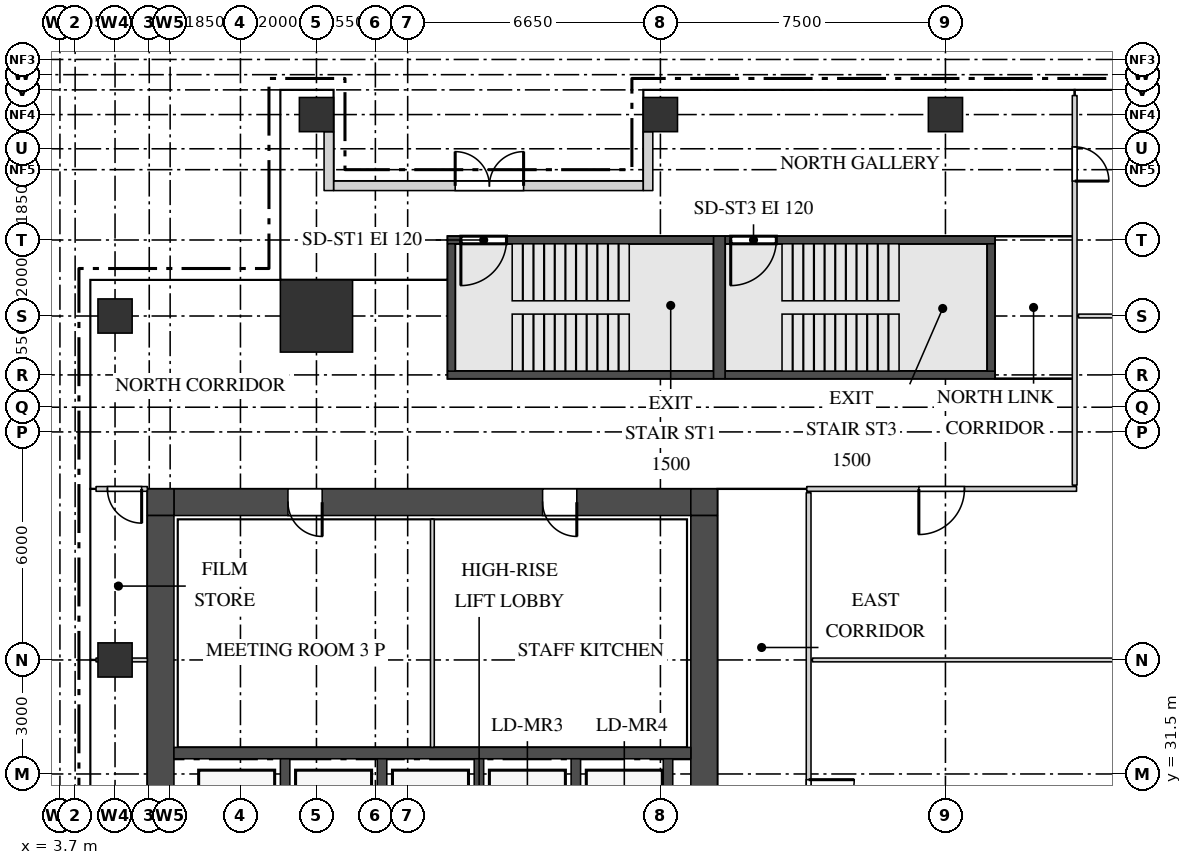
"""IFC4 building model, lengths in metres.
Left out: names, types, materials, properties, quantities, classifications, styles, units other than length and angle.
Written with IfcOpenShell. Run it as: python <this file> out.ifc"""

import sys

from ifc_helpers import new_model, si_unit, direction, frame, frame_2d, origin, origin_2d, place, context, subcontext, project, spatial, rectangle, extrude, source, transform, mapped, element, fill, save


model = new_model("IFC4")
c1 = context("Model", 3, precision=1e-05, world=origin(), true_north=direction((0.0, 1.0)))
c2 = subcontext(c1, "Body", "Model", "MODEL_VIEW")
j1 = project(units=[si_unit("LENGTHUNIT", "METRE"), si_unit("PLANEANGLEUNIT", "RADIAN")], contexts=[c1])
p1 = place(None, origin())
s1 = spatial("IfcSite", under=j1, at=p1, CompositionType="ELEMENT")
p2 = place(p1, origin())
s2 = spatial("IfcBuilding", under=s1, at=p2, CompositionType="ELEMENT")
p3 = place(p2, frame((0.0, 0.0, 246.2)))
s3 = spatial("IfcBuildingStorey", under=s2, at=p3, CompositionType="ELEMENT", Elevation=246.2)
m1 = source(origin(), c2, "Body", "SweptSolid", [
    extrude(rectangle(XDim=13.6, YDim=0.7, at=frame_2d((6.8, 0.0))), origin(), (0.0, 0.0, 1.0), 3.75),
])
p4 = place(p3, frame((6.7, 38.65, 0.0), z_axis=(0.0, 0.0, 1.0), x_axis=(1.0, 0.0, 0.0)))
e1 = element("IfcWall", 1, at=p4, inside=s3, PredefinedType="SHEAR", context=c2, shape_type="MappedRepresentation", body=[
    mapped(m1, transform((0.0, 0.0, 0.0))),
])
m2 = source(origin(), c2, "Body", "SweptSolid", [
    extrude(rectangle(XDim=0.9, YDim=2.1, at=frame_2d((0.45, 1.05))), frame((0.0, 0.36, 0.0), z_axis=(0.0, -1.0, 0.0), x_axis=(1.0, 0.0, 0.0)), (0.0, 0.0, 1.0), 0.72),
])
p5 = place(p4, frame((3.0, 0.0, 0.0)))
e2 = element("IfcOpeningElement", 2, at=p5, cuts=e1, PredefinedType="OPENING", context=c2, shape_type="MappedRepresentation", body=[
    mapped(m2, transform((0.0, 0.0, 0.0))),
])
p6 = place(p4, frame((9.7, 0.0, 0.0)))
e3 = element("IfcOpeningElement", 3, at=p6, cuts=e1, PredefinedType="OPENING", context=c2, shape_type="MappedRepresentation", body=[
    mapped(m2, transform((0.0, 0.0, 0.0))),
])
m3 = source(origin(), c2, "Body", "SweptSolid", [
    extrude(rectangle(XDim=0.7, YDim=0.7, at=frame_2d((0.35, 0.0))), origin(), (0.0, 0.0, 1.0), 3.75),
])
for number, where, z_axis, x_axis in (
    (4, (20.3, 38.65, 0.0), (0.0, 0.0, 1.0), (1.0, 0.0, 0.0)),
    (5, (6.0, 38.65, 0.0), (0.0, 0.0, 1.0), (1.0, 0.0, 0.0)),
):
    element("IfcWall", number, at=place(p3, frame(where, z_axis=z_axis, x_axis=x_axis)), inside=s3, PredefinedType="SHEAR", context=c2, shape_type="MappedRepresentation", body=[
        mapped(m3, transform((0.0, 0.0, 0.0))),
    ])
m4 = source(origin(), c2, "Body", "SweptSolid", [
    extrude(rectangle(XDim=22.6, YDim=0.7, at=frame_2d((11.3, 0.0))), origin(), (0.0, 0.0, 1.0), 3.75),
])
p7 = place(p3, frame((20.65, 15.7, 0.0), z_axis=(0.0, 0.0, 1.0), x_axis=(0.0, 1.0, 0.0)))
e6 = element("IfcWall", 6, at=p7, inside=s3, PredefinedType="SHEAR", context=c2, shape_type="MappedRepresentation", body=[
    mapped(m4, transform((0.0, 0.0, 0.0))),
])
m5 = source(origin(), c2, "Body", "SweptSolid", [
    extrude(rectangle(XDim=1.8, YDim=2.1, at=frame_2d((0.9, 1.05))), frame((0.0, 0.36, 0.0), z_axis=(0.0, -1.0, 0.0), x_axis=(1.0, 0.0, 0.0)), (0.0, 0.0, 1.0), 0.72),
])
p8 = place(p7, frame((10.8, 0.0, 0.0)))
e7 = element("IfcOpeningElement", 7, at=p8, cuts=e6, PredefinedType="OPENING", context=c2, shape_type="MappedRepresentation", body=[
    mapped(m5, transform((0.0, 0.0, 0.0))),
])
p9 = place(p7, frame((0.45, 0.0, 0.0)))
e8 = element("IfcOpeningElement", 8, at=p9, cuts=e6, PredefinedType="OPENING", context=c2, shape_type="MappedRepresentation", body=[
    mapped(m2, transform((0.0, 0.0, 0.0))),
])
p10 = place(p7, frame((2.9, 0.0, 0.0)))
e9 = element("IfcOpeningElement", 9, at=p10, cuts=e6, PredefinedType="OPENING", context=c2, shape_type="MappedRepresentation", body=[
    mapped(m2, transform((0.0, 0.0, 0.0))),
])
p11 = place(p7, frame((5.65, 0.0, 0.0)))
e10 = element("IfcOpeningElement", 10, at=p11, cuts=e6, PredefinedType="OPENING", context=c2, shape_type="MappedRepresentation", body=[
    mapped(m2, transform((0.0, 0.0, 0.0))),
])
p12 = place(p3, frame((6.35, 15.7, 0.0), z_axis=(0.0, 0.0, 1.0), x_axis=(0.0, 1.0, 0.0)))
e11 = element("IfcWall", 11, at=p12, inside=s3, PredefinedType="SHEAR", context=c2, shape_type="MappedRepresentation", body=[
    mapped(m4, transform((0.0, 0.0, 0.0))),
])
m6 = source(origin(), c2, "Body", "SweptSolid", [
    extrude(rectangle(XDim=7.0, YDim=0.2, at=frame_2d((3.5, 0.0))), origin(), (0.0, 0.0, 1.0), 3.75),
])
p13 = place(p3, frame((13.9, 45.55, 0.0), z_axis=(0.0, 0.0, 1.0), x_axis=(1.0, 0.0, 0.0)))
e12 = element("IfcWall", 12, at=p13, inside=s3, PredefinedType="SHEAR", context=c2, shape_type="MappedRepresentation", body=[
    mapped(m6, transform((0.0, 0.0, 0.0))),
])
m7 = source(origin(), c2, "Body", "SweptSolid", [
    extrude(rectangle(XDim=1.2, YDim=2.1, at=frame_2d((0.6, 1.05))), frame((0.0, 0.11, 0.0), z_axis=(0.0, -1.0, 0.0), x_axis=(1.0, 0.0, 0.0)), (0.0, 0.0, 1.0), 0.22),
])
p14 = place(p13, frame((0.35, 0.0, 0.0)))
e13 = element("IfcOpeningElement", 13, at=p14, cuts=e12, PredefinedType="OPENING", context=c2, shape_type="MappedRepresentation", body=[
    mapped(m7, transform((0.0, 0.0, 0.0))),
])
p15 = place(p3, frame((13.9, 42.0, 0.0), z_axis=(0.0, 0.0, 1.0), x_axis=(1.0, 0.0, 0.0)))
e14 = element("IfcWall", 14, at=p15, inside=s3, PredefinedType="SHEAR", context=c2, shape_type="MappedRepresentation", body=[
    mapped(m6, transform((0.0, 0.0, 0.0))),
])
m8 = source(origin(), c2, "Body", "SweptSolid", [
    extrude(rectangle(XDim=7.1, YDim=0.2, at=frame_2d((3.55, 0.0))), origin(), (0.0, 0.0, 1.0), 3.75),
])
p16 = place(p3, frame((21.2, 45.55, 0.0), z_axis=(0.0, 0.0, 1.0), x_axis=(1.0, 0.0, 0.0)))
e15 = element("IfcWall", 15, at=p16, inside=s3, PredefinedType="SHEAR", context=c2, shape_type="MappedRepresentation", body=[
    mapped(m8, transform((0.0, 0.0, 0.0))),
])
p17 = place(p16, frame((0.15, 0.0, 0.0)))
e16 = element("IfcOpeningElement", 16, at=p17, cuts=e15, PredefinedType="OPENING", context=c2, shape_type="MappedRepresentation", body=[
    mapped(m7, transform((0.0, 0.0, 0.0))),
])
p18 = place(p3, frame((21.2, 42.0, 0.0), z_axis=(0.0, 0.0, 1.0), x_axis=(1.0, 0.0, 0.0)))
e17 = element("IfcWall", 17, at=p18, inside=s3, PredefinedType="SHEAR", context=c2, shape_type="MappedRepresentation", body=[
    mapped(m8, transform((0.0, 0.0, 0.0))),
])
m9 = source(origin(), c2, "Body", "SweptSolid", [
    extrude(rectangle(XDim=3.75, YDim=0.3, at=frame_2d((1.875, 0.0))), origin(), (0.0, 0.0, 1.0), 3.75),
])
p19 = place(p3, frame((21.05, 41.9, 0.0), z_axis=(0.0, 0.0, 1.0), x_axis=(0.0, 1.0, 0.0)))
e18 = element("IfcWall", 18, at=p19, inside=s3, PredefinedType="SHEAR", context=c2, shape_type="MappedRepresentation", body=[
    mapped(m9, transform((0.0, 0.0, 0.0))),
])
m10 = source(origin(), c2, "Body", "SweptSolid", [
    extrude(rectangle(XDim=3.35, YDim=0.2, at=frame_2d((1.675, 0.0))), origin(), (0.0, 0.0, 1.0), 3.75),
])
for number, where, z_axis, x_axis in (
    (19, (14.0, 42.1, 0.0), (0.0, 0.0, 1.0), (0.0, 1.0, 0.0)),
    (20, (28.2, 42.1, 0.0), (0.0, 0.0, 1.0), (0.0, 1.0, 0.0)),
):
    element("IfcWall", number, at=place(p3, frame(where, z_axis=z_axis, x_axis=x_axis)), inside=s3, PredefinedType="SHEAR", context=c2, shape_type="MappedRepresentation", body=[
        mapped(m10, transform((0.0, 0.0, 0.0))),
    ])
m11 = source(origin(), c2, "Body", "SweptSolid", [
    extrude(rectangle(XDim=13.6, YDim=0.3, at=frame_2d((6.8, 0.0))), origin(), (0.0, 0.0, 1.0), 3.75),
])
p20 = place(p3, frame((6.7, 32.05, 0.0), z_axis=(0.0, 0.0, 1.0), x_axis=(1.0, 0.0, 0.0)))
e21 = element("IfcWall", 21, at=p20, inside=s3, PredefinedType="STANDARD", context=c2, shape_type="MappedRepresentation", body=[
    mapped(m11, transform((0.0, 0.0, 0.0))),
])
m12 = source(origin(), c2, "Body", "SweptSolid", [
    extrude(rectangle(XDim=2.4, YDim=0.25, at=frame_2d((1.2, 0.0))), origin(), (0.0, 0.0, 1.0), 3.75),
])
for number, where, z_axis, x_axis in (
    (22, (17.275, 29.5, 0.0), (0.0, 0.0, 1.0), (0.0, 1.0, 0.0)),
    (23, (19.7, 29.5, 0.0), (0.0, 0.0, 1.0), (0.0, 1.0, 0.0)),
    (24, (9.625, 29.5, 0.0), (0.0, 0.0, 1.0), (0.0, 1.0, 0.0)),
    (25, (12.175, 29.5, 0.0), (0.0, 0.0, 1.0), (0.0, 1.0, 0.0)),
    (26, (14.725, 29.5, 0.0), (0.0, 0.0, 1.0), (0.0, 1.0, 0.0)),
):
    element("IfcWall", number, at=place(p3, frame(where, z_axis=z_axis, x_axis=x_axis)), inside=s3, PredefinedType="STANDARD", context=c2, shape_type="MappedRepresentation", body=[
        mapped(m12, transform((0.0, 0.0, 0.0))),
    ])
m13 = source(origin(), c2, "Body", "SweptSolid", [
    extrude(rectangle(XDim=1.9, YDim=1.9, at=origin_2d()), origin(), (0.0, 0.0, 1.0), 4.0),
])
p21 = place(p3, frame((10.45, 43.55, 0.0), z_axis=(0.0, 0.0, 1.0), x_axis=(1.0, 0.0, 0.0)))
e27 = element("IfcColumn", 27, at=p21, inside=s3, PredefinedType="COLUMN", context=c2, shape_type="MappedRepresentation", body=[
    mapped(m13, transform((0.0, 0.0, 0.0))),
])
m14 = source(origin(), c2, "Body", "SweptSolid", [
    extrude(rectangle(XDim=0.9, YDim=0.9, at=origin_2d()), origin(), (0.0, 0.0, 1.0), 3.75),
])
for number, where, z_axis, x_axis in (
    (28, (10.45, 48.85, 0.0), (0.0, 0.0, 1.0), (1.0, 0.0, 0.0)),
    (29, (19.5, 48.85, 0.0), (0.0, 0.0, 1.0), (1.0, 0.0, 0.0)),
    (30, (27.0, 48.85, 0.0), (0.0, 0.0, 1.0), (1.0, 0.0, 0.0)),
    (31, (5.15, 34.5, 0.0), (0.0, 0.0, 1.0), (1.0, 0.0, 0.0)),
    (32, (5.15, 43.55, 0.0), (0.0, 0.0, 1.0), (1.0, 0.0, 0.0)),
):
    element("IfcColumn", number, at=place(p3, frame(where, z_axis=z_axis, x_axis=x_axis)), inside=s3, PredefinedType="COLUMN", context=c2, shape_type="MappedRepresentation", body=[
        mapped(m14, transform((0.0, 0.0, 0.0))),
    ])
m15 = source(origin(), c2, "Body", "SweptSolid", [
    extrude(rectangle(XDim=8.15, YDim=0.25, at=frame_2d((4.075, 0.0))), origin(), (0.0, 0.0, 1.0), 3.35),
])
p22 = place(p3, frame((10.9, 46.975, 0.0), z_axis=(0.0, 0.0, 1.0), x_axis=(1.0, 0.0, 0.0)))
e33 = element("IfcWall", 33, at=p22, inside=s3, PredefinedType="SOLIDWALL", context=c2, shape_type="MappedRepresentation", body=[
    mapped(m15, transform((0.0, 0.0, 0.0))),
])
m16 = source(origin(), c2, "Body", "SweptSolid", [
    extrude(rectangle(XDim=2.55, YDim=2.4, at=frame_2d((1.275, 1.2))), frame((0.0, 0.135, 0.0), z_axis=(0.0, -1.0, 0.0), x_axis=(1.0, 0.0, 0.0)), (0.0, 0.0, 1.0), 0.27),
])
p23 = place(p22, frame((0.35, 0.0, 0.0)))
e34 = element("IfcOpeningElement", 34, at=p23, cuts=e33, PredefinedType="OPENING", context=c2, shape_type="MappedRepresentation", body=[
    mapped(m16, transform((0.0, 0.0, 0.0))),
])
p24 = place(p22, frame((5.3, 0.0, 0.0)))
e35 = element("IfcOpeningElement", 35, at=p24, cuts=e33, PredefinedType="OPENING", context=c2, shape_type="MappedRepresentation", body=[
    mapped(m16, transform((0.0, 0.0, 0.0))),
])
m17 = source(origin(), c2, "Body", "SweptSolid", [
    extrude(rectangle(XDim=1.8, YDim=2.4, at=frame_2d((0.9, 1.2))), frame((0.0, 0.135, 0.0), z_axis=(0.0, -1.0, 0.0), x_axis=(1.0, 0.0, 0.0)), (0.0, 0.0, 1.0), 0.27),
])
p25 = place(p22, frame((3.2, 0.0, 0.0)))
e36 = element("IfcOpeningElement", 36, at=p25, cuts=e33, PredefinedType="OPENING", context=c2, shape_type="MappedRepresentation", body=[
    mapped(m17, transform((0.0, 0.0, 0.0))),
])
m18 = source(origin(), c2, "Body", "SweptSolid", [
    extrude(rectangle(XDim=1.55, YDim=0.25, at=frame_2d((0.775, 0.0))), origin(), (0.0, 0.0, 1.0), 3.35),
])
for number, where, z_axis, x_axis in (
    (37, (10.775, 48.4, 0.0), (0.0, 0.0, 1.0), (0.0, -1.0, 0.0)),
    (38, (19.175, 48.4, 0.0), (0.0, 0.0, 1.0), (0.0, -1.0, 0.0)),
):
    element("IfcWall", number, at=place(p3, frame(where, z_axis=z_axis, x_axis=x_axis)), inside=s3, PredefinedType="SOLIDWALL", context=c2, shape_type="MappedRepresentation", body=[
        mapped(m18, transform((0.0, 0.0, 0.0))),
    ])
m19 = source(origin(), c2, "Body", "SweptSolid", [
    extrude(rectangle(XDim=20.8, YDim=0.125, at=frame_2d((10.4, 0.0))), origin(), (0.0, 0.0, 1.0), 3.8),
])
p26 = place(p3, frame((23.4, 18.1, 0.0), z_axis=(0.0, 0.0, 1.0), x_axis=(0.0, 1.0, 0.0)))
e39 = element("IfcWall", 39, at=p26, inside=s3, PredefinedType="PARTITIONING", context=c2, shape_type="MappedRepresentation", body=[
    mapped(m19, transform((0.0, 0.0, 0.0))),
])
m20 = source(origin(), c2, "Body", "SweptSolid", [
    extrude(rectangle(XDim=1.2, YDim=2.1, at=frame_2d((0.6, 1.05))), frame((0.0, 0.073, 0.0), z_axis=(0.0, -1.0, 0.0), x_axis=(1.0, 0.0, 0.0)), (0.0, 0.0, 1.0), 0.145),
])
p27 = place(p26, frame((12.05, 0.0, 0.0)))
e40 = element("IfcOpeningElement", 40, at=p27, cuts=e39, PredefinedType="OPENING", context=c2, shape_type="MappedRepresentation", body=[
    mapped(m20, transform((0.0, 0.0, 0.0))),
])
m21 = source(origin(), c2, "Body", "SweptSolid", [
    extrude(rectangle(XDim=6.0, YDim=0.1, at=frame_2d((3.0, 0.0))), origin(), (0.0, 0.0, 1.0), 3.8),
])
p28 = place(p3, frame((13.5, 32.2, 0.0), z_axis=(0.0, 0.0, 1.0), x_axis=(0.0, 1.0, 0.0)))
e41 = element("IfcWall", 41, at=p28, inside=s3, PredefinedType="PARTITIONING", context=c2, shape_type="MappedRepresentation", body=[
    mapped(m21, transform((0.0, 0.0, 0.0))),
])
m22 = source(origin(), c2, "Body", "SweptSolid", [
    extrude(rectangle(XDim=1.35, YDim=0.1, at=frame_2d((0.675, 0.0))), origin(), (0.0, 0.0, 1.0), 3.8),
])
p29 = place(p3, frame((4.65, 34.5, 0.0), z_axis=(0.0, 0.0, 1.0), x_axis=(1.0, 0.0, 0.0)))
e42 = element("IfcWall", 42, at=p29, inside=s3, PredefinedType="PARTITIONING", context=c2, shape_type="MappedRepresentation", body=[
    mapped(m22, transform((0.0, 0.0, 0.0))),
])
m23 = source(origin(), c2, "Body", "SweptSolid", [
    extrude(rectangle(XDim=25.85, YDim=0.1, at=frame_2d((12.925, 0.0))), origin(), (0.0, 0.0, 1.0), 3.8),
])
p30 = place(p3, frame((23.5, 34.5, 0.0), z_axis=(0.0, 0.0, 1.0), x_axis=(1.0, 0.0, 0.0)))
e43 = element("IfcWall", 43, at=p30, inside=s3, PredefinedType="PARTITIONING", context=c2, shape_type="MappedRepresentation", body=[
    mapped(m23, transform((0.0, 0.0, 0.0))),
])
m24 = source(origin(), c2, "Body", "SweptSolid", [
    extrude(rectangle(XDim=1.35, YDim=0.125, at=frame_2d((0.675, 0.0))), origin(), (0.0, 0.0, 1.0), 3.8),
])
p31 = place(p3, frame((4.65, 39.0, 0.0), z_axis=(0.0, 0.0, 1.0), x_axis=(1.0, 0.0, 0.0)))
e44 = element("IfcWall", 44, at=p31, inside=s3, PredefinedType="PARTITIONING", context=c2, shape_type="MappedRepresentation", body=[
    mapped(m24, transform((0.0, 0.0, 0.0))),
])
m25 = source(origin(), c2, "Body", "SweptSolid", [
    extrude(rectangle(XDim=0.9, YDim=2.1, at=frame_2d((0.45, 1.05))), frame((0.0, 0.073, 0.0), z_axis=(0.0, -1.0, 0.0), x_axis=(1.0, 0.0, 0.0)), (0.0, 0.0, 1.0), 0.145),
])
p32 = place(p31, frame((0.3, 0.0, 0.0)))
e45 = element("IfcOpeningElement", 45, at=p32, cuts=e44, PredefinedType="OPENING", context=c2, shape_type="MappedRepresentation", body=[
    mapped(m25, transform((0.0, 0.0, 0.0))),
])
m26 = source(origin(), c2, "Body", "SweptSolid", [
    extrude(rectangle(XDim=7.1, YDim=0.125, at=frame_2d((3.55, 0.0))), origin(), (0.0, 0.0, 1.0), 3.8),
])
p33 = place(p3, frame((23.35, 39.0, 0.0), z_axis=(0.0, 0.0, 1.0), x_axis=(1.0, 0.0, 0.0)))
e46 = element("IfcWall", 46, at=p33, inside=s3, PredefinedType="PARTITIONING", context=c2, shape_type="MappedRepresentation", body=[
    mapped(m26, transform((0.0, 0.0, 0.0))),
])
p34 = place(p33, frame((2.95, 0.0, 0.0)))
e47 = element("IfcOpeningElement", 47, at=p34, cuts=e46, PredefinedType="OPENING", context=c2, shape_type="MappedRepresentation", body=[
    mapped(m20, transform((0.0, 0.0, 0.0))),
])
m27 = source(origin(), c2, "Body", "SweptSolid", [
    extrude(rectangle(XDim=10.25, YDim=0.125, at=frame_2d((5.125, 0.0))), origin(), (0.0, 0.0, 1.0), 3.8),
])
p35 = place(p3, frame((30.4, 39.1, 0.0), z_axis=(0.0, 0.0, 1.0), x_axis=(0.0, 1.0, 0.0)))
e48 = element("IfcWall", 48, at=p35, inside=s3, PredefinedType="PARTITIONING", context=c2, shape_type="MappedRepresentation", body=[
    mapped(m27, transform((0.0, 0.0, 0.0))),
])
p36 = place(p35, frame((8.0, 0.0, 0.0)))
e49 = element("IfcOpeningElement", 49, at=p36, cuts=e48, PredefinedType="OPENING", context=c2, shape_type="MappedRepresentation", body=[
    mapped(m25, transform((0.0, 0.0, 0.0))),
])
m28 = source(origin(), c2, "Body", "SweptSolid", [
    extrude(rectangle(XDim=18.85, YDim=0.1, at=frame_2d((9.425, 0.0))), origin(), (0.0, 0.0, 1.0), 3.3),
])
p37 = place(p3, frame((30.5, 43.55, 0.0), z_axis=(0.0, 0.0, 1.0), x_axis=(1.0, 0.0, 0.0)))
e50 = element("IfcWall", 50, at=p37, inside=s3, PredefinedType="PARTITIONING", context=c2, shape_type="MappedRepresentation", body=[
    mapped(m28, transform((0.0, 0.0, 0.0))),
])
m29 = source(origin(), c2, "Body", "SweptSolid", [
    extrude(rectangle(XDim=2.55, YDim=2.4, at=frame_2d((1.275, 1.2))), frame((0.0, 0.03, 0.0), z_axis=(0.0, -1.0, 0.0), x_axis=(1.0, 0.0, 0.0)), (0.0, 0.0, 1.0), 0.06),
])
p38 = place(p23, origin())
e51 = element("IfcWindow", 51, at=p38, inside=s3, PartitioningType="SINGLE_PANEL", PredefinedType="WINDOW", context=c2, shape_type="MappedRepresentation", body=[
    mapped(m29, transform((0.0, 0.0, 0.0))),
])
fill(e34, e51)
p39 = place(p24, origin())
e52 = element("IfcWindow", 52, at=p39, inside=s3, PartitioningType="SINGLE_PANEL", PredefinedType="WINDOW", context=c2, shape_type="MappedRepresentation", body=[
    mapped(m29, transform((0.0, 0.0, 0.0))),
])
fill(e35, e52)
m30 = source(origin(), c2, "Body", "SweptSolid", [
    extrude(rectangle(XDim=1.8, YDim=2.4, at=frame_2d((0.9, 1.2))), frame((0.0, 0.025, 0.0), z_axis=(0.0, -1.0, 0.0), x_axis=(1.0, 0.0, 0.0)), (0.0, 0.0, 1.0), 0.05),
])
p40 = place(p25, origin())
e53 = element("IfcDoor", 53, at=p40, inside=s3, OperationType="DOUBLE_DOOR_DOUBLE_SWING", PredefinedType="DOOR", context=c2, shape_type="MappedRepresentation", body=[
    mapped(m30, transform((0.0, 0.0, 0.0))),
])
fill(e36, e53)
m31 = source(origin(), c2, "Body", "SweptSolid", [
    extrude(rectangle(XDim=0.9, YDim=2.1, at=frame_2d((0.45, 1.05))), frame((0.0, 0.3, 0.0), z_axis=(0.0, -1.0, 0.0), x_axis=(1.0, 0.0, 0.0)), (0.0, 0.0, 1.0), 0.6),
])
p41 = place(p5, origin())
e54 = element("IfcDoor", 54, at=p41, inside=s3, OperationType="SINGLE_SWING_RIGHT", PredefinedType="DOOR", context=c2, shape_type="MappedRepresentation", body=[
    mapped(m31, transform((0.0, 0.0, 0.0))),
])
fill(e2, e54)
p42 = place(p6, origin())
e55 = element("IfcDoor", 55, at=p42, inside=s3, OperationType="SINGLE_SWING_RIGHT", PredefinedType="DOOR", context=c2, shape_type="MappedRepresentation", body=[
    mapped(m31, transform((0.0, 0.0, 0.0))),
])
fill(e3, e55)
m32 = source(origin(), c2, "Body", "SweptSolid", [
    extrude(rectangle(XDim=0.9, YDim=2.1, at=frame_2d((0.45, 1.05))), frame((0.0, 0.025, 0.0), z_axis=(0.0, -1.0, 0.0), x_axis=(1.0, 0.0, 0.0)), (0.0, 0.0, 1.0), 0.05),
])
p43 = place(p32, origin())
e56 = element("IfcDoor", 56, at=p43, inside=s3, OperationType="SINGLE_SWING_RIGHT", PredefinedType="DOOR", context=c2, shape_type="MappedRepresentation", body=[
    mapped(m32, transform((0.0, 0.0, 0.0))),
])
fill(e45, e56)
m33 = source(origin(), c2, "Body", "SweptSolid", [
    extrude(rectangle(XDim=1.2, YDim=2.1, at=frame_2d((0.6, 1.05))), frame((0.0, 0.025, 0.0), z_axis=(0.0, -1.0, 0.0), x_axis=(1.0, 0.0, 0.0)), (0.0, 0.0, 1.0), 0.05),
])
p44 = place(p27, origin())
e57 = element("IfcDoor", 57, at=p44, inside=s3, OperationType="SINGLE_SWING_RIGHT", PredefinedType="DOOR", context=c2, shape_type="MappedRepresentation", body=[
    mapped(m33, transform((0.0, 0.0, 0.0))),
])
fill(e40, e57)
p45 = place(p34, origin())
e58 = element("IfcDoor", 58, at=p45, inside=s3, OperationType="SINGLE_SWING_LEFT", PredefinedType="DOOR", context=c2, shape_type="MappedRepresentation", body=[
    mapped(m33, transform((0.0, 0.0, 0.0))),
])
fill(e47, e58)
p46 = place(p36, origin())
e59 = element("IfcDoor", 59, at=p46, inside=s3, OperationType="SINGLE_SWING_LEFT", PredefinedType="DOOR", context=c2, shape_type="MappedRepresentation", body=[
    mapped(m32, transform((0.0, 0.0, 0.0))),
])
fill(e49, e59)
p47 = place(p14, origin())
e60 = element("IfcDoor", 60, at=p47, inside=s3, OperationType="SINGLE_SWING_LEFT", PredefinedType="DOOR", context=c2, shape_type="MappedRepresentation", body=[
    mapped(m33, transform((0.0, 0.0, 0.0))),
])
fill(e13, e60)
p48 = place(p17, origin())
e61 = element("IfcDoor", 61, at=p48, inside=s3, OperationType="SINGLE_SWING_LEFT", PredefinedType="DOOR", context=c2, shape_type="MappedRepresentation", body=[
    mapped(m33, transform((0.0, 0.0, 0.0))),
])
fill(e16, e61)
save(model, sys.argv[1])
